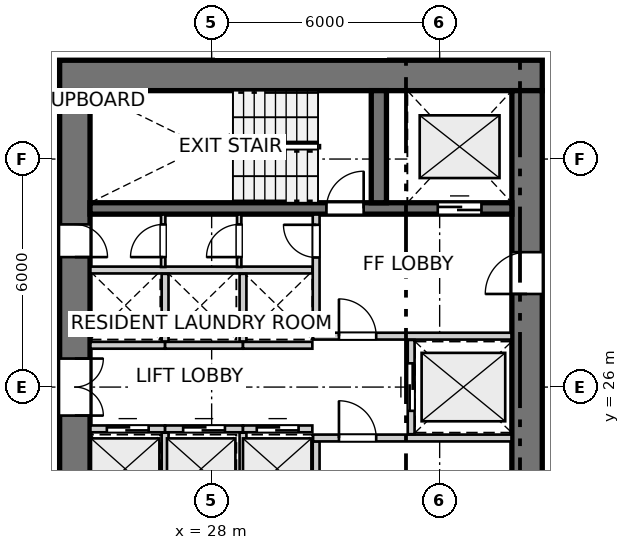
"""IFC4 building model, lengths in metres.
Left out: names, types, materials, properties, quantities, classifications, styles, units other than length and angle.
Written with IfcOpenShell. Run it as: python <this file> out.ifc"""

import sys

from ifc_helpers import new_model, si_unit, direction, frame, frame_2d, origin, place, context, subcontext, project, spatial, rectangle, extrude, source, transform, mapped, element, fill, save


model = new_model("IFC4")
c1 = context("Model", 3, precision=1e-05, world=origin(), true_north=direction((0.0, 1.0)))
c2 = subcontext(c1, "Body", "Model", "MODEL_VIEW")
j1 = project(units=[si_unit("LENGTHUNIT", "METRE"), si_unit("PLANEANGLEUNIT", "RADIAN")], contexts=[c1])
p1 = place(None, origin())
s1 = spatial("IfcSite", under=j1, at=p1, CompositionType="ELEMENT")
p2 = place(p1, origin())
s2 = spatial("IfcBuilding", under=s1, at=p2, CompositionType="ELEMENT")
p3 = place(p2, frame((0.0, 0.0, 27.0)))
s3 = spatial("IfcBuildingStorey", under=s2, at=p3, CompositionType="ELEMENT", Elevation=27.0)
p4 = place(p3, frame((36.7, 34.2, 0.0), z_axis=(0.0, 0.0, 1.0), x_axis=(-1.0, 0.0, 0.0)))
e1 = element("IfcWall", 1, at=p4, inside=s3, PredefinedType="SHEAR", context=c2, shape_type="SweptSolid", body=[
    extrude(rectangle(XDim=12.7, YDim=0.8, at=frame_2d((6.35, 0.0))), origin(), (0.0, 0.0, 1.0), 2.935),
])
p5 = place(p3, frame((24.4, 33.8, 0.0), z_axis=(0.0, 0.0, 1.0), x_axis=(0.0, -1.0, 0.0)))
e2 = element("IfcWall", 2, at=p5, inside=s3, PredefinedType="SHEAR", context=c2, shape_type="SweptSolid", body=[
    extrude(rectangle(XDim=15.6, YDim=0.8, at=frame_2d((7.8, 0.0))), origin(), (0.0, 0.0, 1.0), 2.935),
])
p6 = place(p5, frame((7.05, 0.0, 0.0)))
e3 = element("IfcOpeningElement", 3, at=p6, cuts=e2, PredefinedType="OPENING", context=c2, shape_type="SweptSolid", body=[
    extrude(rectangle(XDim=1.5, YDim=2.15, at=frame_2d((0.75, 1.075))), frame((0.0, 0.41, 0.0), z_axis=(0.0, -1.0, 0.0), x_axis=(1.0, 0.0, 0.0)), (0.0, 0.0, 1.0), 0.82),
])
p7 = place(p5, frame((3.52, 0.0, 0.0)))
e4 = element("IfcOpeningElement", 4, at=p7, cuts=e2, PredefinedType="OPENING", context=c2, shape_type="SweptSolid", body=[
    extrude(rectangle(XDim=0.86, YDim=2.05, at=frame_2d((0.43, 1.025))), frame((0.0, 0.41, 0.0), z_axis=(0.0, -1.0, 0.0), x_axis=(1.0, 0.0, 0.0)), (0.0, 0.0, 1.0), 0.82),
])
p8 = place(p5, frame((11.22, 0.0, 0.0)))
e5 = element("IfcOpeningElement", 5, at=p8, cuts=e2, PredefinedType="OPENING", context=c2, shape_type="SweptSolid", body=[
    extrude(rectangle(XDim=0.86, YDim=2.05, at=frame_2d((0.43, 1.025))), frame((0.0, 0.41, 0.0), z_axis=(0.0, -1.0, 0.0), x_axis=(1.0, 0.0, 0.0)), (0.0, 0.0, 1.0), 0.82),
])
p9 = place(p3, frame((36.3, 18.2, 0.0), z_axis=(0.0, 0.0, 1.0), x_axis=(0.0, 1.0, 0.0)))
e6 = element("IfcWall", 6, at=p9, inside=s3, PredefinedType="SHEAR", context=c2, shape_type="SweptSolid", body=[
    extrude(rectangle(XDim=15.6, YDim=0.8, at=frame_2d((7.8, 0.0))), origin(), (0.0, 0.0, 1.0), 2.935),
])
p10 = place(p9, frame((4.25, 0.0, 0.0)))
e7 = element("IfcOpeningElement", 7, at=p10, cuts=e6, PredefinedType="OPENING", context=c2, shape_type="SweptSolid", body=[
    extrude(rectangle(XDim=1.1, YDim=2.15, at=frame_2d((0.55, 1.075))), frame((0.0, 0.41, 0.0), z_axis=(0.0, -1.0, 0.0), x_axis=(1.0, 0.0, 0.0)), (0.0, 0.0, 1.0), 0.82),
])
p11 = place(p9, frame((10.25, 0.0, 0.0)))
e8 = element("IfcOpeningElement", 8, at=p11, cuts=e6, PredefinedType="OPENING", context=c2, shape_type="SweptSolid", body=[
    extrude(rectangle(XDim=1.1, YDim=2.15, at=frame_2d((0.55, 1.075))), frame((0.0, 0.41, 0.0), z_axis=(0.0, -1.0, 0.0), x_axis=(1.0, 0.0, 0.0)), (0.0, 0.0, 1.0), 0.82),
])
p12 = place(p3, frame((24.8, 30.7, 0.0), z_axis=(0.0, 0.0, 1.0), x_axis=(1.0, 0.0, 0.0)))
e9 = element("IfcWall", 9, at=p12, inside=s3, PredefinedType="SHEAR", context=c2, shape_type="SweptSolid", body=[
    extrude(rectangle(XDim=11.1, YDim=0.3, at=frame_2d((5.55, 0.0))), origin(), (0.0, 0.0, 1.0), 2.935),
])
p13 = place(p12, frame((6.22, 0.0, 0.0)))
e10 = element("IfcOpeningElement", 10, at=p13, cuts=e9, PredefinedType="OPENING", context=c2, shape_type="SweptSolid", body=[
    extrude(rectangle(XDim=0.98, YDim=2.15, at=frame_2d((0.49, 1.075))), frame((0.0, 0.16, 0.0), z_axis=(0.0, -1.0, 0.0), x_axis=(1.0, 0.0, 0.0)), (0.0, 0.0, 1.0), 0.32),
])
p14 = place(p12, frame((9.15, 0.0, 0.0)))
e11 = element("IfcOpeningElement", 11, at=p14, cuts=e9, PredefinedType="OPENING", context=c2, shape_type="SweptSolid", body=[
    extrude(rectangle(XDim=1.15, YDim=2.15, at=frame_2d((0.575, 1.075))), frame((0.0, 0.16, 0.0), z_axis=(0.0, -1.0, 0.0), x_axis=(1.0, 0.0, 0.0)), (0.0, 0.0, 1.0), 0.32),
])
p15 = place(p3, frame((32.4, 30.85, 0.0), z_axis=(0.0, 0.0, 1.0), x_axis=(0.0, 1.0, 0.0)))
e12 = element("IfcWall", 12, at=p15, inside=s3, PredefinedType="SHEAR", context=c2, shape_type="SweptSolid", body=[
    extrude(rectangle(XDim=2.95, YDim=0.4, at=frame_2d((1.475, 0.0))), origin(), (0.0, 0.0, 1.0), 2.935),
])
p16 = place(p3, frame((30.75, 21.46, 0.0), z_axis=(0.0, 0.0, 1.0), x_axis=(0.0, 1.0, 0.0)))
e13 = element("IfcWall", 13, at=p16, inside=s3, PredefinedType="PARTITIONING", context=c2, shape_type="SweptSolid", body=[
    extrude(rectangle(XDim=3.11, YDim=0.18, at=frame_2d((1.555, 0.0))), origin(), (0.0, 0.0, 1.0), 2.935),
])
p17 = place(p16, frame((0.26, 0.0, 0.0)))
e14 = element("IfcOpeningElement", 14, at=p17, cuts=e13, PredefinedType="OPENING", context=c2, shape_type="SweptSolid", body=[
    extrude(rectangle(XDim=0.86, YDim=2.05, at=frame_2d((0.43, 1.025))), frame((0.0, 0.1, 0.0), z_axis=(0.0, -1.0, 0.0), x_axis=(1.0, 0.0, 0.0)), (0.0, 0.0, 1.0), 0.2),
])
p18 = place(p3, frame((30.67, 24.66, 0.0), z_axis=(0.0, 0.0, 1.0), x_axis=(1.0, 0.0, 0.0)))
e15 = element("IfcWall", 15, at=p18, inside=s3, PredefinedType="PARTITIONING", context=c2, shape_type="SweptSolid", body=[
    extrude(rectangle(XDim=5.22, YDim=0.18, at=frame_2d((2.61, 0.0))), origin(), (0.0, 0.0, 1.0), 2.935),
])
p19 = place(p18, frame((0.68, 0.0, 0.0)))
e16 = element("IfcOpeningElement", 16, at=p19, cuts=e15, PredefinedType="OPENING", context=c2, shape_type="SweptSolid", body=[
    extrude(rectangle(XDim=0.98, YDim=2.15, at=frame_2d((0.49, 1.075))), frame((0.0, 0.1, 0.0), z_axis=(0.0, -1.0, 0.0), x_axis=(1.0, 0.0, 0.0)), (0.0, 0.0, 1.0), 0.2),
])
p20 = place(p3, frame((30.75, 27.43, 0.0), z_axis=(0.0, 0.0, 1.0), x_axis=(0.0, 1.0, 0.0)))
e17 = element("IfcWall", 17, at=p20, inside=s3, PredefinedType="PARTITIONING", context=c2, shape_type="SweptSolid", body=[
    extrude(rectangle(XDim=3.11, YDim=0.18, at=frame_2d((1.555, 0.0))), origin(), (0.0, 0.0, 1.0), 2.935),
])
p21 = place(p20, frame((1.98, 0.0, 0.0)))
e18 = element("IfcOpeningElement", 18, at=p21, cuts=e17, PredefinedType="OPENING", context=c2, shape_type="SweptSolid", body=[
    extrude(rectangle(XDim=0.86, YDim=2.05, at=frame_2d((0.43, 1.025))), frame((0.0, 0.1, 0.0), z_axis=(0.0, -1.0, 0.0), x_axis=(1.0, 0.0, 0.0)), (0.0, 0.0, 1.0), 0.2),
])
p22 = place(p3, frame((30.67, 27.34, 0.0), z_axis=(0.0, 0.0, 1.0), x_axis=(1.0, 0.0, 0.0)))
e19 = element("IfcWall", 19, at=p22, inside=s3, PredefinedType="PARTITIONING", context=c2, shape_type="SweptSolid", body=[
    extrude(rectangle(XDim=5.22, YDim=0.18, at=frame_2d((2.61, 0.0))), origin(), (0.0, 0.0, 1.0), 2.935),
])
p23 = place(p22, frame((0.68, 0.0, 0.0)))
e20 = element("IfcOpeningElement", 20, at=p23, cuts=e19, PredefinedType="OPENING", context=c2, shape_type="SweptSolid", body=[
    extrude(rectangle(XDim=0.98, YDim=2.15, at=frame_2d((0.49, 1.075))), frame((0.0, 0.1, 0.0), z_axis=(0.0, -1.0, 0.0), x_axis=(1.0, 0.0, 0.0)), (0.0, 0.0, 1.0), 0.2),
])
p24 = place(p3, frame((33.25, 24.76, 0.0), z_axis=(0.0, 0.0, 1.0), x_axis=(0.0, 1.0, 0.0)))
e21 = element("IfcWall", 21, at=p24, inside=s3, PredefinedType="PARTITIONING", context=c2, shape_type="SweptSolid", body=[
    extrude(rectangle(XDim=2.48, YDim=0.18, at=frame_2d((1.24, 0.0))), origin(), (0.0, 0.0, 1.0), 2.935),
])
p25 = place(p24, frame((0.615, 0.0, 0.0)))
e22 = element("IfcOpeningElement", 22, at=p25, cuts=e21, PredefinedType="OPENING", context=c2, shape_type="SweptSolid", body=[
    extrude(rectangle(XDim=1.25, YDim=2.15, at=frame_2d((0.625, 1.075))), frame((0.0, 0.1, 0.0), z_axis=(0.0, -1.0, 0.0), x_axis=(1.0, 0.0, 0.0)), (0.0, 0.0, 1.0), 0.2),
])
p26 = place(p3, frame((24.81, 24.9, 0.0), z_axis=(0.0, 0.0, 1.0), x_axis=(1.0, 0.0, 0.0)))
e23 = element("IfcWall", 23, at=p26, inside=s3, PredefinedType="PARTITIONING", context=c2, shape_type="SweptSolid", body=[
    extrude(rectangle(XDim=1.965, YDim=0.18, at=frame_2d((0.982, 0.0))), origin(), (0.0, 0.0, 1.0), 2.935),
])
p27 = place(p26, frame((0.433, 0.0, 0.0)))
e24 = element("IfcOpeningElement", 24, at=p27, cuts=e23, PredefinedType="OPENING", context=c2, shape_type="SweptSolid", body=[
    extrude(rectangle(XDim=1.1, YDim=2.15, at=frame_2d((0.55, 1.075))), frame((0.0, 0.1, 0.0), z_axis=(0.0, -1.0, 0.0), x_axis=(1.0, 0.0, 0.0)), (0.0, 0.0, 1.0), 0.2),
])
p28 = place(p3, frame((26.775, 24.9, 0.0), z_axis=(0.0, 0.0, 1.0), x_axis=(1.0, 0.0, 0.0)))
e25 = element("IfcWall", 25, at=p28, inside=s3, PredefinedType="PARTITIONING", context=c2, shape_type="SweptSolid", body=[
    extrude(rectangle(XDim=2.05, YDim=0.18, at=frame_2d((1.025, 0.0))), origin(), (0.0, 0.0, 1.0), 2.935),
])
p29 = place(p28, frame((0.475, 0.0, 0.0)))
e26 = element("IfcOpeningElement", 26, at=p29, cuts=e25, PredefinedType="OPENING", context=c2, shape_type="SweptSolid", body=[
    extrude(rectangle(XDim=1.1, YDim=2.15, at=frame_2d((0.55, 1.075))), frame((0.0, 0.1, 0.0), z_axis=(0.0, -1.0, 0.0), x_axis=(1.0, 0.0, 0.0)), (0.0, 0.0, 1.0), 0.2),
])
p30 = place(p3, frame((26.775, 23.02, 0.0), z_axis=(0.0, 0.0, 1.0), x_axis=(0.0, 1.0, 0.0)))
e27 = element("IfcWall", 27, at=p30, inside=s3, PredefinedType="PARTITIONING", context=c2, shape_type="SweptSolid", body=[
    extrude(rectangle(XDim=1.78, YDim=0.18, at=frame_2d((0.89, 0.0))), origin(), (0.0, 0.0, 1.0), 2.935),
])
p31 = place(p3, frame((28.825, 24.9, 0.0), z_axis=(0.0, 0.0, 1.0), x_axis=(1.0, 0.0, 0.0)))
e28 = element("IfcWall", 28, at=p31, inside=s3, PredefinedType="PARTITIONING", context=c2, shape_type="SweptSolid", body=[
    extrude(rectangle(XDim=1.825, YDim=0.18, at=frame_2d((0.913, 0.0))), origin(), (0.0, 0.0, 1.0), 2.935),
])
p32 = place(p31, frame((0.363, 0.0, 0.0)))
e29 = element("IfcOpeningElement", 29, at=p32, cuts=e28, PredefinedType="OPENING", context=c2, shape_type="SweptSolid", body=[
    extrude(rectangle(XDim=1.1, YDim=2.15, at=frame_2d((0.55, 1.075))), frame((0.0, 0.1, 0.0), z_axis=(0.0, -1.0, 0.0), x_axis=(1.0, 0.0, 0.0)), (0.0, 0.0, 1.0), 0.2),
])
p33 = place(p3, frame((28.825, 23.02, 0.0), z_axis=(0.0, 0.0, 1.0), x_axis=(0.0, 1.0, 0.0)))
e30 = element("IfcWall", 30, at=p33, inside=s3, PredefinedType="PARTITIONING", context=c2, shape_type="SweptSolid", body=[
    extrude(rectangle(XDim=1.78, YDim=0.18, at=frame_2d((0.89, 0.0))), origin(), (0.0, 0.0, 1.0), 2.935),
])
p34 = place(p3, frame((24.81, 29.08, 0.0), z_axis=(0.0, 0.0, 1.0), x_axis=(1.0, 0.0, 0.0)))
e31 = element("IfcWall", 31, at=p34, inside=s3, PredefinedType="PARTITIONING", context=c2, shape_type="SweptSolid", body=[
    extrude(rectangle(XDim=5.84, YDim=0.18, at=frame_2d((2.92, 0.0))), origin(), (0.0, 0.0, 1.0), 2.935),
])
p35 = place(p3, frame((24.81, 27.1, 0.0), z_axis=(0.0, 0.0, 1.0), x_axis=(1.0, 0.0, 0.0)))
e32 = element("IfcWall", 32, at=p35, inside=s3, PredefinedType="PARTITIONING", context=c2, shape_type="SweptSolid", body=[
    extrude(rectangle(XDim=1.965, YDim=0.18, at=frame_2d((0.982, 0.0))), origin(), (0.0, 0.0, 1.0), 2.935),
])
p36 = place(p3, frame((26.775, 27.1, 0.0), z_axis=(0.0, 0.0, 1.0), x_axis=(1.0, 0.0, 0.0)))
e33 = element("IfcWall", 33, at=p36, inside=s3, PredefinedType="PARTITIONING", context=c2, shape_type="SweptSolid", body=[
    extrude(rectangle(XDim=2.05, YDim=0.18, at=frame_2d((1.025, 0.0))), origin(), (0.0, 0.0, 1.0), 2.935),
])
p37 = place(p3, frame((26.775, 27.2, 0.0), z_axis=(0.0, 0.0, 1.0), x_axis=(0.0, 1.0, 0.0)))
e34 = element("IfcWall", 34, at=p37, inside=s3, PredefinedType="PARTITIONING", context=c2, shape_type="SweptSolid", body=[
    extrude(rectangle(XDim=1.78, YDim=0.18, at=frame_2d((0.89, 0.0))), origin(), (0.0, 0.0, 1.0), 2.935),
])
p38 = place(p3, frame((28.825, 27.1, 0.0), z_axis=(0.0, 0.0, 1.0), x_axis=(1.0, 0.0, 0.0)))
e35 = element("IfcWall", 35, at=p38, inside=s3, PredefinedType="PARTITIONING", context=c2, shape_type="SweptSolid", body=[
    extrude(rectangle(XDim=1.825, YDim=0.18, at=frame_2d((0.913, 0.0))), origin(), (0.0, 0.0, 1.0), 2.935),
])
p39 = place(p3, frame((28.825, 27.2, 0.0), z_axis=(0.0, 0.0, 1.0), x_axis=(0.0, 1.0, 0.0)))
e36 = element("IfcWall", 36, at=p39, inside=s3, PredefinedType="PARTITIONING", context=c2, shape_type="SweptSolid", body=[
    extrude(rectangle(XDim=1.78, YDim=0.18, at=frame_2d((0.89, 0.0))), origin(), (0.0, 0.0, 1.0), 2.935),
])
p40 = place(p3, frame((26.725, 29.16, 0.0), z_axis=(0.0, 0.0, 1.0), x_axis=(0.0, 1.0, 0.0)))
e37 = element("IfcWall", 37, at=p40, inside=s3, PredefinedType="PARTITIONING", context=c2, shape_type="SweptSolid", body=[
    extrude(rectangle(XDim=1.38, YDim=0.115, at=frame_2d((0.69, 0.0))), origin(), (0.0, 0.0, 1.0), 2.935),
])
p41 = place(p40, frame((0.26, 0.0, 0.0)))
e38 = element("IfcOpeningElement", 38, at=p41, cuts=e37, PredefinedType="OPENING", context=c2, shape_type="SweptSolid", body=[
    extrude(rectangle(XDim=0.86, YDim=2.05, at=frame_2d((0.43, 1.025))), frame((0.0, 0.067, 0.0), z_axis=(0.0, -1.0, 0.0), x_axis=(1.0, 0.0, 0.0)), (0.0, 0.0, 1.0), 0.135),
])
p42 = place(p3, frame((28.725, 29.16, 0.0), z_axis=(0.0, 0.0, 1.0), x_axis=(0.0, 1.0, 0.0)))
e39 = element("IfcWall", 39, at=p42, inside=s3, PredefinedType="PARTITIONING", context=c2, shape_type="SweptSolid", body=[
    extrude(rectangle(XDim=1.38, YDim=0.115, at=frame_2d((0.69, 0.0))), origin(), (0.0, 0.0, 1.0), 2.935),
])
p43 = place(p42, frame((0.26, 0.0, 0.0)))
e40 = element("IfcOpeningElement", 40, at=p43, cuts=e39, PredefinedType="OPENING", context=c2, shape_type="SweptSolid", body=[
    extrude(rectangle(XDim=0.86, YDim=2.05, at=frame_2d((0.43, 1.025))), frame((0.0, 0.067, 0.0), z_axis=(0.0, -1.0, 0.0), x_axis=(1.0, 0.0, 0.0)), (0.0, 0.0, 1.0), 0.135),
])
m1 = source(origin(), c2, "Body", "SweptSolid", [
    extrude(rectangle(XDim=0.98, YDim=2.15, at=frame_2d((0.49, 1.075))), frame((0.0, 0.025, 0.0), z_axis=(0.0, -1.0, 0.0), x_axis=(1.0, 0.0, 0.0)), (0.0, 0.0, 1.0), 0.05),
])
p44 = place(p13, origin())
e41 = element("IfcDoor", 41, at=p44, inside=s3, OperationType="SINGLE_SWING_RIGHT", PredefinedType="DOOR", context=c2, shape_type="MappedRepresentation", body=[
    mapped(m1, transform((0.0, 0.0, 0.0), x_axis=(1.0, 0.0, 0.0), y_axis=(0.0, 1.0, 0.0), z_axis=(0.0, 0.0, 1.0), scale=1.0)),
])
fill(e10, e41)
m2 = source(origin(), c2, "Body", "SweptSolid", [
    extrude(rectangle(XDim=1.15, YDim=2.15, at=frame_2d((0.575, 1.075))), frame((0.0, 0.025, 0.0), z_axis=(0.0, -1.0, 0.0), x_axis=(1.0, 0.0, 0.0)), (0.0, 0.0, 1.0), 0.05),
])
p45 = place(p14, origin())
e42 = element("IfcDoor", 42, at=p45, inside=s3, OperationType="DOUBLE_DOOR_SLIDING", PredefinedType="DOOR", context=c2, shape_type="MappedRepresentation", body=[
    mapped(m2, transform((0.0, 0.0, 0.0), x_axis=(1.0, 0.0, 0.0), y_axis=(0.0, 1.0, 0.0), z_axis=(0.0, 0.0, 1.0), scale=1.0)),
])
fill(e11, e42)
m3 = source(origin(), c2, "Body", "SweptSolid", [
    extrude(rectangle(XDim=1.1, YDim=2.15, at=frame_2d((0.55, 1.075))), frame((0.0, 0.025, 0.0), z_axis=(0.0, -1.0, 0.0), x_axis=(1.0, 0.0, 0.0)), (0.0, 0.0, 1.0), 0.05),
])
p46 = place(p11, origin())
e43 = element("IfcDoor", 43, at=p46, inside=s3, OperationType="SINGLE_SWING_LEFT", PredefinedType="DOOR", context=c2, shape_type="MappedRepresentation", body=[
    mapped(m3, transform((0.0, 0.0, 0.0), x_axis=(1.0, 0.0, 0.0), y_axis=(0.0, 1.0, 0.0), z_axis=(0.0, 0.0, 1.0), scale=1.0)),
])
fill(e8, e43)
m4 = source(origin(), c2, "Body", "SweptSolid", [
    extrude(rectangle(XDim=1.5, YDim=2.15, at=frame_2d((0.75, 1.075))), frame((0.0, 0.025, 0.0), z_axis=(0.0, -1.0, 0.0), x_axis=(1.0, 0.0, 0.0)), (0.0, 0.0, 1.0), 0.05),
])
p47 = place(p6, origin())
e44 = element("IfcDoor", 44, at=p47, inside=s3, OperationType="DOUBLE_DOOR_SINGLE_SWING", PredefinedType="DOOR", context=c2, shape_type="MappedRepresentation", body=[
    mapped(m4, transform((0.0, 0.0, 0.0), x_axis=(1.0, 0.0, 0.0), y_axis=(0.0, 1.0, 0.0), z_axis=(0.0, 0.0, 1.0), scale=1.0)),
])
fill(e3, e44)
m5 = source(origin(), c2, "Body", "SweptSolid", [
    extrude(rectangle(XDim=0.86, YDim=2.05, at=frame_2d((0.43, 1.025))), frame((0.0, 0.025, 0.0), z_axis=(0.0, -1.0, 0.0), x_axis=(1.0, 0.0, 0.0)), (0.0, 0.0, 1.0), 0.05),
])
p48 = place(p7, origin())
e45 = element("IfcDoor", 45, at=p48, inside=s3, OperationType="SINGLE_SWING_RIGHT", PredefinedType="DOOR", context=c2, shape_type="MappedRepresentation", body=[
    mapped(m5, transform((0.0, 0.0, 0.0), x_axis=(1.0, 0.0, 0.0), y_axis=(0.0, 1.0, 0.0), z_axis=(0.0, 0.0, 1.0), scale=1.0)),
])
fill(e4, e45)
p49 = place(p19, origin())
e46 = element("IfcDoor", 46, at=p49, inside=s3, OperationType="SINGLE_SWING_LEFT", PredefinedType="DOOR", context=c2, shape_type="MappedRepresentation", body=[
    mapped(m1, transform((0.0, 0.0, 0.0), x_axis=(1.0, 0.0, 0.0), y_axis=(0.0, 1.0, 0.0), z_axis=(0.0, 0.0, 1.0), scale=1.0)),
])
fill(e16, e46)
p50 = place(p21, origin())
e47 = element("IfcDoor", 47, at=p50, inside=s3, OperationType="SINGLE_SWING_RIGHT", PredefinedType="DOOR", context=c2, shape_type="MappedRepresentation", body=[
    mapped(m5, transform((0.0, 0.0, 0.0), x_axis=(1.0, 0.0, 0.0), y_axis=(0.0, 1.0, 0.0), z_axis=(0.0, 0.0, 1.0), scale=1.0)),
])
fill(e18, e47)
p51 = place(p23, origin())
e48 = element("IfcDoor", 48, at=p51, inside=s3, OperationType="SINGLE_SWING_LEFT", PredefinedType="DOOR", context=c2, shape_type="MappedRepresentation", body=[
    mapped(m1, transform((0.0, 0.0, 0.0), x_axis=(1.0, 0.0, 0.0), y_axis=(0.0, 1.0, 0.0), z_axis=(0.0, 0.0, 1.0), scale=1.0)),
])
fill(e20, e48)
m6 = source(origin(), c2, "Body", "SweptSolid", [
    extrude(rectangle(XDim=1.25, YDim=2.15, at=frame_2d((0.625, 1.075))), frame((0.0, 0.025, 0.0), z_axis=(0.0, -1.0, 0.0), x_axis=(1.0, 0.0, 0.0)), (0.0, 0.0, 1.0), 0.05),
])
p52 = place(p25, origin())
e49 = element("IfcDoor", 49, at=p52, inside=s3, OperationType="DOUBLE_DOOR_SLIDING", PredefinedType="DOOR", context=c2, shape_type="MappedRepresentation", body=[
    mapped(m6, transform((0.0, 0.0, 0.0), x_axis=(1.0, 0.0, 0.0), y_axis=(0.0, 1.0, 0.0), z_axis=(0.0, 0.0, 1.0), scale=1.0)),
])
fill(e22, e49)
p53 = place(p27, origin())
e50 = element("IfcDoor", 50, at=p53, inside=s3, OperationType="DOUBLE_DOOR_SLIDING", PredefinedType="DOOR", context=c2, shape_type="MappedRepresentation", body=[
    mapped(m3, transform((0.0, 0.0, 0.0), x_axis=(1.0, 0.0, 0.0), y_axis=(0.0, 1.0, 0.0), z_axis=(0.0, 0.0, 1.0), scale=1.0)),
])
fill(e24, e50)
p54 = place(p29, origin())
e51 = element("IfcDoor", 51, at=p54, inside=s3, OperationType="DOUBLE_DOOR_SLIDING", PredefinedType="DOOR", context=c2, shape_type="MappedRepresentation", body=[
    mapped(m3, transform((0.0, 0.0, 0.0), x_axis=(1.0, 0.0, 0.0), y_axis=(0.0, 1.0, 0.0), z_axis=(0.0, 0.0, 1.0), scale=1.0)),
])
fill(e26, e51)
p55 = place(p32, origin())
e52 = element("IfcDoor", 52, at=p55, inside=s3, OperationType="DOUBLE_DOOR_SLIDING", PredefinedType="DOOR", context=c2, shape_type="MappedRepresentation", body=[
    mapped(m3, transform((0.0, 0.0, 0.0), x_axis=(1.0, 0.0, 0.0), y_axis=(0.0, 1.0, 0.0), z_axis=(0.0, 0.0, 1.0), scale=1.0)),
])
fill(e29, e52)
p56 = place(p41, origin())
e53 = element("IfcDoor", 53, at=p56, inside=s3, OperationType="SINGLE_SWING_LEFT", PredefinedType="DOOR", context=c2, shape_type="MappedRepresentation", body=[
    mapped(m5, transform((0.0, 0.0, 0.0), x_axis=(1.0, 0.0, 0.0), y_axis=(0.0, 1.0, 0.0), z_axis=(0.0, 0.0, 1.0), scale=1.0)),
])
fill(e38, e53)
p57 = place(p43, origin())
e54 = element("IfcDoor", 54, at=p57, inside=s3, OperationType="SINGLE_SWING_LEFT", PredefinedType="DOOR", context=c2, shape_type="MappedRepresentation", body=[
    mapped(m5, transform((0.0, 0.0, 0.0), x_axis=(1.0, 0.0, 0.0), y_axis=(0.0, 1.0, 0.0), z_axis=(0.0, 0.0, 1.0), scale=1.0)),
])
fill(e40, e54)
save(model, sys.argv[1])
